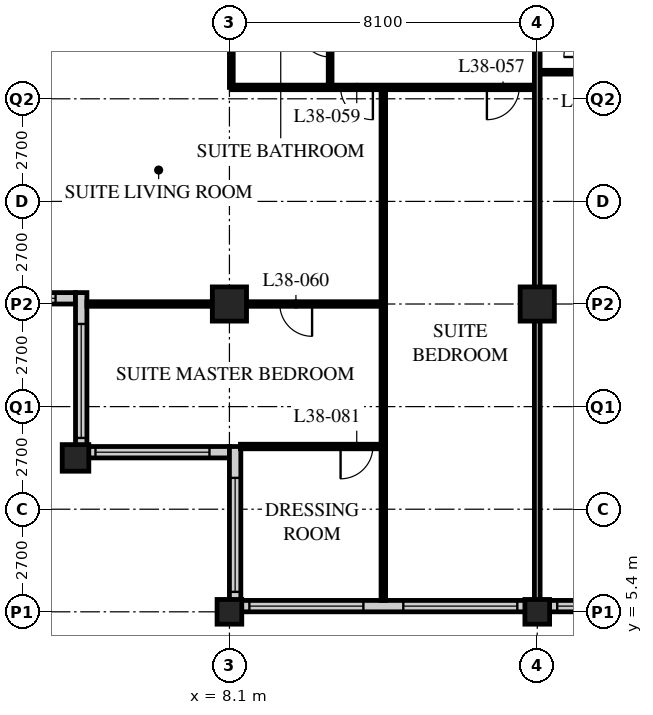
"""IFC4 building model, lengths in metres.
Left out: names, types, materials, properties, quantities, classifications, styles, units other than length and angle.
Written with IfcOpenShell. Run it as: python <this file> out.ifc"""

import sys

from ifc_helpers import new_model, si_unit, direction, frame, frame_2d, origin, origin_2d, place, context, subcontext, project, spatial, rectangle, hollow_rectangle, extrude, element, fill, save


model = new_model("IFC4")
c1 = context("Model", 3, precision=1e-05, world=origin(), true_north=direction((0.0, 1.0)))
c2 = subcontext(c1, "Body", "Model", "MODEL_VIEW")
j1 = project(units=[si_unit("LENGTHUNIT", "METRE"), si_unit("PLANEANGLEUNIT", "RADIAN")], contexts=[c1])
p1 = place(None, origin())
s1 = spatial("IfcSite", under=j1, at=p1, CompositionType="ELEMENT")
p2 = place(p1, origin())
s2 = spatial("IfcBuilding", under=s1, at=p2, CompositionType="ELEMENT")
p3 = place(p2, frame((0.0, 0.0, 147.6)))
s3 = spatial("IfcBuildingStorey", under=s2, at=p3, CompositionType="ELEMENT", Elevation=147.6)
p4 = place(p3, frame((4.05, 9.45, 0.0), z_axis=(0.0, 0.0, 1.0), x_axis=(1.0, 0.0, 0.0)))
e1 = element("IfcColumn", 1, at=p4, inside=s3, PredefinedType="COLUMN", context=c2, shape_type="SweptSolid", body=[
    extrude(hollow_rectangle(XDim=0.7, YDim=0.7, WallThickness=0.07, at=origin_2d()), origin(), (0.0, 0.0, 1.0), 3.4),
])
p5 = place(p3, frame((8.1, 5.4, 0.0), z_axis=(0.0, 0.0, 1.0), x_axis=(1.0, 0.0, 0.0)))
e2 = element("IfcColumn", 2, at=p5, inside=s3, PredefinedType="COLUMN", context=c2, shape_type="SweptSolid", body=[
    extrude(hollow_rectangle(XDim=0.65, YDim=0.65, WallThickness=0.055, at=origin_2d()), origin(), (0.0, 0.0, 1.0), 3.4),
])
p6 = place(p3, frame((8.1, 13.5, 0.0), z_axis=(0.0, 0.0, 1.0), x_axis=(1.0, 0.0, 0.0)))
e3 = element("IfcColumn", 3, at=p6, inside=s3, PredefinedType="COLUMN", context=c2, shape_type="SweptSolid", body=[
    extrude(hollow_rectangle(XDim=0.9, YDim=0.9, WallThickness=0.1, at=origin_2d()), origin(), (0.0, 0.0, 1.0), 3.4),
])
p7 = place(p3, frame((16.2, 5.4, 0.0), z_axis=(0.0, 0.0, 1.0), x_axis=(1.0, 0.0, 0.0)))
e4 = element("IfcColumn", 4, at=p7, inside=s3, PredefinedType="COLUMN", context=c2, shape_type="SweptSolid", body=[
    extrude(hollow_rectangle(XDim=0.65, YDim=0.65, WallThickness=0.055, at=origin_2d()), origin(), (0.0, 0.0, 1.0), 3.4),
])
p8 = place(p3, frame((16.2, 13.5, 0.0), z_axis=(0.0, 0.0, 1.0), x_axis=(1.0, 0.0, 0.0)))
e5 = element("IfcColumn", 5, at=p8, inside=s3, PredefinedType="COLUMN", context=c2, shape_type="SweptSolid", body=[
    extrude(hollow_rectangle(XDim=0.9, YDim=0.9, WallThickness=0.1, at=origin_2d()), origin(), (0.0, 0.0, 1.0), 3.4),
])
p9 = place(p3, frame((8.4, 5.55, 0.0), z_axis=(0.0, 0.0, 1.0), x_axis=(1.0, 0.0, 0.0)))
e6 = element("IfcWall", 6, at=p9, inside=s3, PredefinedType="SOLIDWALL", context=c2, shape_type="SweptSolid", body=[
    extrude(rectangle(XDim=40.2, YDim=0.3, at=frame_2d((20.1, 0.0))), origin(), (0.0, 0.0, 1.0), 3.19),
])
p10 = place(p9, frame((0.225, 0.0, 0.9)))
e7 = element("IfcOpeningElement", 7, at=p10, cuts=e6, PredefinedType="OPENING", context=c2, shape_type="SweptSolid", body=[
    extrude(rectangle(XDim=3.0, YDim=1.4, at=frame_2d((1.5, 0.7))), frame((0.0, 0.16, 0.0), z_axis=(0.0, -1.0, 0.0), x_axis=(1.0, 0.0, 0.0)), (0.0, 0.0, 1.0), 0.32),
])
p11 = place(p9, frame((4.275, 0.0, 0.9)))
e8 = element("IfcOpeningElement", 8, at=p11, cuts=e6, PredefinedType="OPENING", context=c2, shape_type="SweptSolid", body=[
    extrude(rectangle(XDim=3.0, YDim=1.4, at=frame_2d((1.5, 0.7))), frame((0.0, 0.16, 0.0), z_axis=(0.0, -1.0, 0.0), x_axis=(1.0, 0.0, 0.0)), (0.0, 0.0, 1.0), 0.32),
])
p12 = place(p9, frame((8.325, 0.0, 0.9)))
e9 = element("IfcOpeningElement", 9, at=p12, cuts=e6, PredefinedType="OPENING", context=c2, shape_type="SweptSolid", body=[
    extrude(rectangle(XDim=3.0, YDim=1.4, at=frame_2d((1.5, 0.7))), frame((0.0, 0.16, 0.0), z_axis=(0.0, -1.0, 0.0), x_axis=(1.0, 0.0, 0.0)), (0.0, 0.0, 1.0), 0.32),
])
p13 = place(p9, frame((12.375, 0.0, 0.9)))
e10 = element("IfcOpeningElement", 10, at=p13, cuts=e6, PredefinedType="OPENING", context=c2, shape_type="SweptSolid", body=[
    extrude(rectangle(XDim=3.0, YDim=1.4, at=frame_2d((1.5, 0.7))), frame((0.0, 0.16, 0.0), z_axis=(0.0, -1.0, 0.0), x_axis=(1.0, 0.0, 0.0)), (0.0, 0.0, 1.0), 0.32),
])
p14 = place(p9, frame((16.425, 0.0, 0.9)))
e11 = element("IfcOpeningElement", 11, at=p14, cuts=e6, PredefinedType="OPENING", context=c2, shape_type="SweptSolid", body=[
    extrude(rectangle(XDim=3.0, YDim=1.4, at=frame_2d((1.5, 0.7))), frame((0.0, 0.16, 0.0), z_axis=(0.0, -1.0, 0.0), x_axis=(1.0, 0.0, 0.0)), (0.0, 0.0, 1.0), 0.32),
])
p15 = place(p9, frame((20.475, 0.0, 0.9)))
e12 = element("IfcOpeningElement", 12, at=p15, cuts=e6, PredefinedType="OPENING", context=c2, shape_type="SweptSolid", body=[
    extrude(rectangle(XDim=3.0, YDim=1.4, at=frame_2d((1.5, 0.7))), frame((0.0, 0.16, 0.0), z_axis=(0.0, -1.0, 0.0), x_axis=(1.0, 0.0, 0.0)), (0.0, 0.0, 1.0), 0.32),
])
p16 = place(p9, frame((24.525, 0.0, 0.9)))
e13 = element("IfcOpeningElement", 13, at=p16, cuts=e6, PredefinedType="OPENING", context=c2, shape_type="SweptSolid", body=[
    extrude(rectangle(XDim=3.0, YDim=1.4, at=frame_2d((1.5, 0.7))), frame((0.0, 0.16, 0.0), z_axis=(0.0, -1.0, 0.0), x_axis=(1.0, 0.0, 0.0)), (0.0, 0.0, 1.0), 0.32),
])
p17 = place(p9, frame((28.575, 0.0, 0.9)))
e14 = element("IfcOpeningElement", 14, at=p17, cuts=e6, PredefinedType="OPENING", context=c2, shape_type="SweptSolid", body=[
    extrude(rectangle(XDim=3.0, YDim=1.4, at=frame_2d((1.5, 0.7))), frame((0.0, 0.16, 0.0), z_axis=(0.0, -1.0, 0.0), x_axis=(1.0, 0.0, 0.0)), (0.0, 0.0, 1.0), 0.32),
])
p18 = place(p9, frame((32.625, 0.0, 0.9)))
e15 = element("IfcOpeningElement", 15, at=p18, cuts=e6, PredefinedType="OPENING", context=c2, shape_type="SweptSolid", body=[
    extrude(rectangle(XDim=3.0, YDim=1.4, at=frame_2d((1.5, 0.7))), frame((0.0, 0.16, 0.0), z_axis=(0.0, -1.0, 0.0), x_axis=(1.0, 0.0, 0.0)), (0.0, 0.0, 1.0), 0.32),
])
p19 = place(p9, frame((36.675, 0.0, 0.9)))
e16 = element("IfcOpeningElement", 16, at=p19, cuts=e6, PredefinedType="OPENING", context=c2, shape_type="SweptSolid", body=[
    extrude(rectangle(XDim=3.0, YDim=1.4, at=frame_2d((1.5, 0.7))), frame((0.0, 0.16, 0.0), z_axis=(0.0, -1.0, 0.0), x_axis=(1.0, 0.0, 0.0)), (0.0, 0.0, 1.0), 0.32),
])
p20 = place(p3, frame((0.3, 13.65, 0.0), z_axis=(0.0, 0.0, 1.0), x_axis=(1.0, 0.0, 0.0)))
e17 = element("IfcWall", 17, at=p20, inside=s3, PredefinedType="SOLIDWALL", context=c2, shape_type="SweptSolid", body=[
    extrude(rectangle(XDim=3.75, YDim=0.3, at=frame_2d((1.875, 0.0))), origin(), (0.0, 0.0, 1.0), 3.19),
])
p21 = place(p20, frame((0.225, 0.0, 0.9)))
e18 = element("IfcOpeningElement", 18, at=p21, cuts=e17, PredefinedType="OPENING", context=c2, shape_type="SweptSolid", body=[
    extrude(rectangle(XDim=3.0, YDim=1.4, at=frame_2d((1.5, 0.7))), frame((0.0, 0.16, 0.0), z_axis=(0.0, -1.0, 0.0), x_axis=(1.0, 0.0, 0.0)), (0.0, 0.0, 1.0), 0.32),
])
p22 = place(p3, frame((4.2, 13.8, 0.0), z_axis=(0.0, 0.0, 1.0), x_axis=(0.0, -1.0, 0.0)))
e19 = element("IfcWall", 19, at=p22, inside=s3, PredefinedType="SOLIDWALL", context=c2, shape_type="SweptSolid", body=[
    extrude(rectangle(XDim=4.35, YDim=0.3, at=frame_2d((2.175, 0.0))), origin(), (0.0, 0.0, 1.0), 3.19),
])
p23 = place(p22, frame((0.825, 0.0, 0.9)))
e20 = element("IfcOpeningElement", 20, at=p23, cuts=e19, PredefinedType="OPENING", context=c2, shape_type="SweptSolid", body=[
    extrude(rectangle(XDim=3.0, YDim=1.4, at=frame_2d((1.5, 0.7))), frame((0.0, 0.16, 0.0), z_axis=(0.0, -1.0, 0.0), x_axis=(1.0, 0.0, 0.0)), (0.0, 0.0, 1.0), 0.32),
])
p24 = place(p3, frame((4.35, 9.6, 0.0), z_axis=(0.0, 0.0, 1.0), x_axis=(1.0, 0.0, 0.0)))
e21 = element("IfcWall", 21, at=p24, inside=s3, PredefinedType="SOLIDWALL", context=c2, shape_type="SweptSolid", body=[
    extrude(rectangle(XDim=3.75, YDim=0.3, at=frame_2d((1.875, 0.0))), origin(), (0.0, 0.0, 1.0), 3.19),
])
p25 = place(p24, frame((0.225, 0.0, 0.9)))
e22 = element("IfcOpeningElement", 22, at=p25, cuts=e21, PredefinedType="OPENING", context=c2, shape_type="SweptSolid", body=[
    extrude(rectangle(XDim=3.0, YDim=1.4, at=frame_2d((1.5, 0.7))), frame((0.0, 0.16, 0.0), z_axis=(0.0, -1.0, 0.0), x_axis=(1.0, 0.0, 0.0)), (0.0, 0.0, 1.0), 0.32),
])
p26 = place(p3, frame((8.25, 9.75, 0.0), z_axis=(0.0, 0.0, 1.0), x_axis=(0.0, -1.0, 0.0)))
e23 = element("IfcWall", 23, at=p26, inside=s3, PredefinedType="SOLIDWALL", context=c2, shape_type="SweptSolid", body=[
    extrude(rectangle(XDim=4.35, YDim=0.3, at=frame_2d((2.175, 0.0))), origin(), (0.0, 0.0, 1.0), 3.19),
])
p27 = place(p26, frame((0.825, 0.0, 0.9)))
e24 = element("IfcOpeningElement", 24, at=p27, cuts=e23, PredefinedType="OPENING", context=c2, shape_type="SweptSolid", body=[
    extrude(rectangle(XDim=3.0, YDim=1.4, at=frame_2d((1.5, 0.7))), frame((0.0, 0.16, 0.0), z_axis=(0.0, -1.0, 0.0), x_axis=(1.0, 0.0, 0.0)), (0.0, 0.0, 1.0), 0.32),
])
p28 = place(p3, frame((16.2, 19.6, 0.0), z_axis=(0.0, 0.0, 1.0), x_axis=(1.0, 0.0, 0.0)))
e25 = element("IfcWall", 25, at=p28, inside=s3, PredefinedType="PARTITIONING", context=c2, shape_type="SweptSolid", body=[
    extrude(rectangle(XDim=1.5, YDim=0.1, at=frame_2d((0.75, 0.0))), origin(), (0.0, 0.0, 1.0), 3.19),
])
p29 = place(p3, frame((10.75, 21.6, 0.0), z_axis=(0.0, 0.0, 1.0), x_axis=(0.0, -1.0, 0.0)))
e26 = element("IfcWall", 26, at=p29, inside=s3, PredefinedType="PARTITIONING", context=c2, shape_type="SweptSolid", body=[
    extrude(rectangle(XDim=2.4, YDim=0.1, at=frame_2d((1.2, 0.0))), origin(), (0.0, 0.0, 1.0), 3.19),
])
p30 = place(p29, frame((0.8, 0.0, 0.0)))
e27 = element("IfcOpeningElement", 27, at=p30, cuts=e26, PredefinedType="OPENING", context=c2, shape_type="SweptSolid", body=[
    extrude(rectangle(XDim=0.8, YDim=2.1, at=frame_2d((0.4, 1.05))), frame((0.0, 0.06, 0.0), z_axis=(0.0, -1.0, 0.0), x_axis=(1.0, 0.0, 0.0)), (0.0, 0.0, 1.0), 0.12),
])
p31 = place(p3, frame((8.15, 21.6, 0.0), z_axis=(0.0, 0.0, 1.0), x_axis=(0.0, -1.0, 0.0)))
e28 = element("IfcWall", 28, at=p31, inside=s3, PredefinedType="PARTITIONING", context=c2, shape_type="SweptSolid", body=[
    extrude(rectangle(XDim=2.4, YDim=0.1, at=frame_2d((1.2, 0.0))), origin(), (0.0, 0.0, 1.0), 2.42),
])
p32 = place(p3, frame((8.15, 19.2, 0.0), z_axis=(0.0, 0.0, 1.0), x_axis=(1.0, 0.0, 0.0)))
e29 = element("IfcWall", 29, at=p32, inside=s3, PredefinedType="PARTITIONING", context=c2, shape_type="SweptSolid", body=[
    extrude(rectangle(XDim=8.05, YDim=0.12, at=frame_2d((4.025, 0.0))), origin(), (0.0, 0.0, 1.0), 3.19),
])
p33 = place(p32, frame((6.725, 0.0, 0.0)))
e30 = element("IfcOpeningElement", 30, at=p33, cuts=e29, PredefinedType="OPENING", context=c2, shape_type="SweptSolid", body=[
    extrude(rectangle(XDim=0.85, YDim=2.1, at=frame_2d((0.425, 1.05))), frame((0.0, 0.07, 0.0), z_axis=(0.0, -1.0, 0.0), x_axis=(1.0, 0.0, 0.0)), (0.0, 0.0, 1.0), 0.14),
])
p34 = place(p32, frame((2.875, 0.0, 0.0)))
e31 = element("IfcOpeningElement", 31, at=p34, cuts=e29, PredefinedType="OPENING", context=c2, shape_type="SweptSolid", body=[
    extrude(rectangle(XDim=0.85, YDim=2.1, at=frame_2d((0.425, 1.05))), frame((0.0, 0.07, 0.0), z_axis=(0.0, -1.0, 0.0), x_axis=(1.0, 0.0, 0.0)), (0.0, 0.0, 1.0), 0.14),
])
p35 = place(p3, frame((12.15, 19.2, 0.0), z_axis=(0.0, 0.0, 1.0), x_axis=(0.0, -1.0, 0.0)))
e32 = element("IfcWall", 32, at=p35, inside=s3, PredefinedType="PARTITIONING", context=c2, shape_type="SweptSolid", body=[
    extrude(rectangle(XDim=13.5, YDim=0.12, at=frame_2d((6.75, 0.0))), origin(), (0.0, 0.0, 1.0), 3.19),
])
p36 = place(p3, frame((12.15, 13.5, 0.0), z_axis=(0.0, 0.0, 1.0), x_axis=(-1.0, 0.0, 0.0)))
e33 = element("IfcWall", 33, at=p36, inside=s3, PredefinedType="PARTITIONING", context=c2, shape_type="SweptSolid", body=[
    extrude(rectangle(XDim=7.8, YDim=0.12, at=frame_2d((3.9, 0.0))), origin(), (0.0, 0.0, 1.0), 2.42),
])
p37 = place(p36, frame((1.875, 0.0, 0.0)))
e34 = element("IfcOpeningElement", 34, at=p37, cuts=e33, PredefinedType="OPENING", context=c2, shape_type="SweptSolid", body=[
    extrude(rectangle(XDim=0.85, YDim=2.1, at=frame_2d((0.425, 1.05))), frame((0.0, 0.07, 0.0), z_axis=(0.0, -1.0, 0.0), x_axis=(1.0, 0.0, 0.0)), (0.0, 0.0, 1.0), 0.14),
])
p38 = place(p3, frame((16.2, 21.6, 0.0), z_axis=(0.0, 0.0, 1.0), x_axis=(0.0, -1.0, 0.0)))
e35 = element("IfcWall", 35, at=p38, inside=s3, PredefinedType="PARTITIONING", context=c2, shape_type="SweptSolid", body=[
    extrude(rectangle(XDim=15.9, YDim=0.15, at=frame_2d((7.95, 0.0))), origin(), (0.0, 0.0, 1.0), 2.42),
])
p39 = place(p3, frame((8.39, 9.75, 0.0), z_axis=(0.0, 0.0, 1.0), x_axis=(1.0, 0.0, 0.0)))
e36 = element("IfcWall", 36, at=p39, inside=s3, PredefinedType="PARTITIONING", context=c2, shape_type="SweptSolid", body=[
    extrude(rectangle(XDim=3.76, YDim=0.12, at=frame_2d((1.88, 0.0))), origin(), (0.0, 0.0, 1.0), 3.19),
])
p40 = place(p39, frame((2.635, 0.0, 0.0)))
e37 = element("IfcOpeningElement", 37, at=p40, cuts=e36, PredefinedType="OPENING", context=c2, shape_type="SweptSolid", body=[
    extrude(rectangle(XDim=0.85, YDim=2.1, at=frame_2d((0.425, 1.05))), frame((0.0, 0.07, 0.0), z_axis=(0.0, -1.0, 0.0), x_axis=(1.0, 0.0, 0.0)), (0.0, 0.0, 1.0), 0.14),
])
p41 = place(p10, origin())
e38 = element("IfcWindow", 38, at=p41, inside=s3, PartitioningType="SINGLE_PANEL", PredefinedType="WINDOW", context=c2, shape_type="SweptSolid", body=[
    extrude(rectangle(XDim=3.0, YDim=1.4, at=frame_2d((1.5, 0.7))), frame((0.0, 0.03, 0.0), z_axis=(0.0, -1.0, 0.0), x_axis=(1.0, 0.0, 0.0)), (0.0, 0.0, 1.0), 0.06),
])
fill(e7, e38)
p42 = place(p11, origin())
e39 = element("IfcWindow", 39, at=p42, inside=s3, PartitioningType="SINGLE_PANEL", PredefinedType="WINDOW", context=c2, shape_type="SweptSolid", body=[
    extrude(rectangle(XDim=3.0, YDim=1.4, at=frame_2d((1.5, 0.7))), frame((0.0, 0.03, 0.0), z_axis=(0.0, -1.0, 0.0), x_axis=(1.0, 0.0, 0.0)), (0.0, 0.0, 1.0), 0.06),
])
fill(e8, e39)
p43 = place(p12, origin())
e40 = element("IfcWindow", 40, at=p43, inside=s3, PartitioningType="SINGLE_PANEL", PredefinedType="WINDOW", context=c2, shape_type="SweptSolid", body=[
    extrude(rectangle(XDim=3.0, YDim=1.4, at=frame_2d((1.5, 0.7))), frame((0.0, 0.03, 0.0), z_axis=(0.0, -1.0, 0.0), x_axis=(1.0, 0.0, 0.0)), (0.0, 0.0, 1.0), 0.06),
])
fill(e9, e40)
p44 = place(p21, origin())
e41 = element("IfcWindow", 41, at=p44, inside=s3, PartitioningType="SINGLE_PANEL", PredefinedType="WINDOW", context=c2, shape_type="SweptSolid", body=[
    extrude(rectangle(XDim=3.0, YDim=1.4, at=frame_2d((1.5, 0.7))), frame((0.0, 0.03, 0.0), z_axis=(0.0, -1.0, 0.0), x_axis=(1.0, 0.0, 0.0)), (0.0, 0.0, 1.0), 0.06),
])
fill(e18, e41)
p45 = place(p23, origin())
e42 = element("IfcWindow", 42, at=p45, inside=s3, PartitioningType="SINGLE_PANEL", PredefinedType="WINDOW", context=c2, shape_type="SweptSolid", body=[
    extrude(rectangle(XDim=3.0, YDim=1.4, at=frame_2d((1.5, 0.7))), frame((0.0, 0.03, 0.0), z_axis=(0.0, -1.0, 0.0), x_axis=(1.0, 0.0, 0.0)), (0.0, 0.0, 1.0), 0.06),
])
fill(e20, e42)
p46 = place(p25, origin())
e43 = element("IfcWindow", 43, at=p46, inside=s3, PartitioningType="SINGLE_PANEL", PredefinedType="WINDOW", context=c2, shape_type="SweptSolid", body=[
    extrude(rectangle(XDim=3.0, YDim=1.4, at=frame_2d((1.5, 0.7))), frame((0.0, 0.03, 0.0), z_axis=(0.0, -1.0, 0.0), x_axis=(1.0, 0.0, 0.0)), (0.0, 0.0, 1.0), 0.06),
])
fill(e22, e43)
p47 = place(p27, origin())
e44 = element("IfcWindow", 44, at=p47, inside=s3, PartitioningType="SINGLE_PANEL", PredefinedType="WINDOW", context=c2, shape_type="SweptSolid", body=[
    extrude(rectangle(XDim=3.0, YDim=1.4, at=frame_2d((1.5, 0.7))), frame((0.0, 0.03, 0.0), z_axis=(0.0, -1.0, 0.0), x_axis=(1.0, 0.0, 0.0)), (0.0, 0.0, 1.0), 0.06),
])
fill(e24, e44)
p48 = place(p33, origin())
e45 = element("IfcDoor", 45, at=p48, inside=s3, OperationType="SINGLE_SWING_RIGHT", PredefinedType="DOOR", context=c2, shape_type="SweptSolid", body=[
    extrude(rectangle(XDim=0.85, YDim=2.1, at=frame_2d((0.425, 1.05))), frame((0.0, 0.025, 0.0), z_axis=(0.0, -1.0, 0.0), x_axis=(1.0, 0.0, 0.0)), (0.0, 0.0, 1.0), 0.05),
])
fill(e30, e45)
p49 = place(p30, origin())
e46 = element("IfcDoor", 46, at=p49, inside=s3, OperationType="SINGLE_SWING_RIGHT", PredefinedType="DOOR", context=c2, shape_type="SweptSolid", body=[
    extrude(rectangle(XDim=0.8, YDim=2.1, at=frame_2d((0.4, 1.05))), frame((0.0, 0.025, 0.0), z_axis=(0.0, -1.0, 0.0), x_axis=(1.0, 0.0, 0.0)), (0.0, 0.0, 1.0), 0.05),
])
fill(e27, e46)
p50 = place(p34, origin())
e47 = element("IfcDoor", 47, at=p50, inside=s3, OperationType="SINGLE_SWING_LEFT", PredefinedType="DOOR", context=c2, shape_type="SweptSolid", body=[
    extrude(rectangle(XDim=0.85, YDim=2.1, at=frame_2d((0.425, 1.05))), frame((0.0, 0.025, 0.0), z_axis=(0.0, -1.0, 0.0), x_axis=(1.0, 0.0, 0.0)), (0.0, 0.0, 1.0), 0.05),
])
fill(e31, e47)
p51 = place(p37, origin())
e48 = element("IfcDoor", 48, at=p51, inside=s3, OperationType="SINGLE_SWING_LEFT", PredefinedType="DOOR", context=c2, shape_type="SweptSolid", body=[
    extrude(rectangle(XDim=0.85, YDim=2.1, at=frame_2d((0.425, 1.05))), frame((0.0, 0.025, 0.0), z_axis=(0.0, -1.0, 0.0), x_axis=(1.0, 0.0, 0.0)), (0.0, 0.0, 1.0), 0.05),
])
fill(e34, e48)
p52 = place(p40, origin())
e49 = element("IfcDoor", 49, at=p52, inside=s3, OperationType="SINGLE_SWING_RIGHT", PredefinedType="DOOR", context=c2, shape_type="SweptSolid", body=[
    extrude(rectangle(XDim=0.85, YDim=2.1, at=frame_2d((0.425, 1.05))), frame((0.0, 0.025, 0.0), z_axis=(0.0, -1.0, 0.0), x_axis=(1.0, 0.0, 0.0)), (0.0, 0.0, 1.0), 0.05),
])
fill(e37, e49)
save(model, sys.argv[1])
